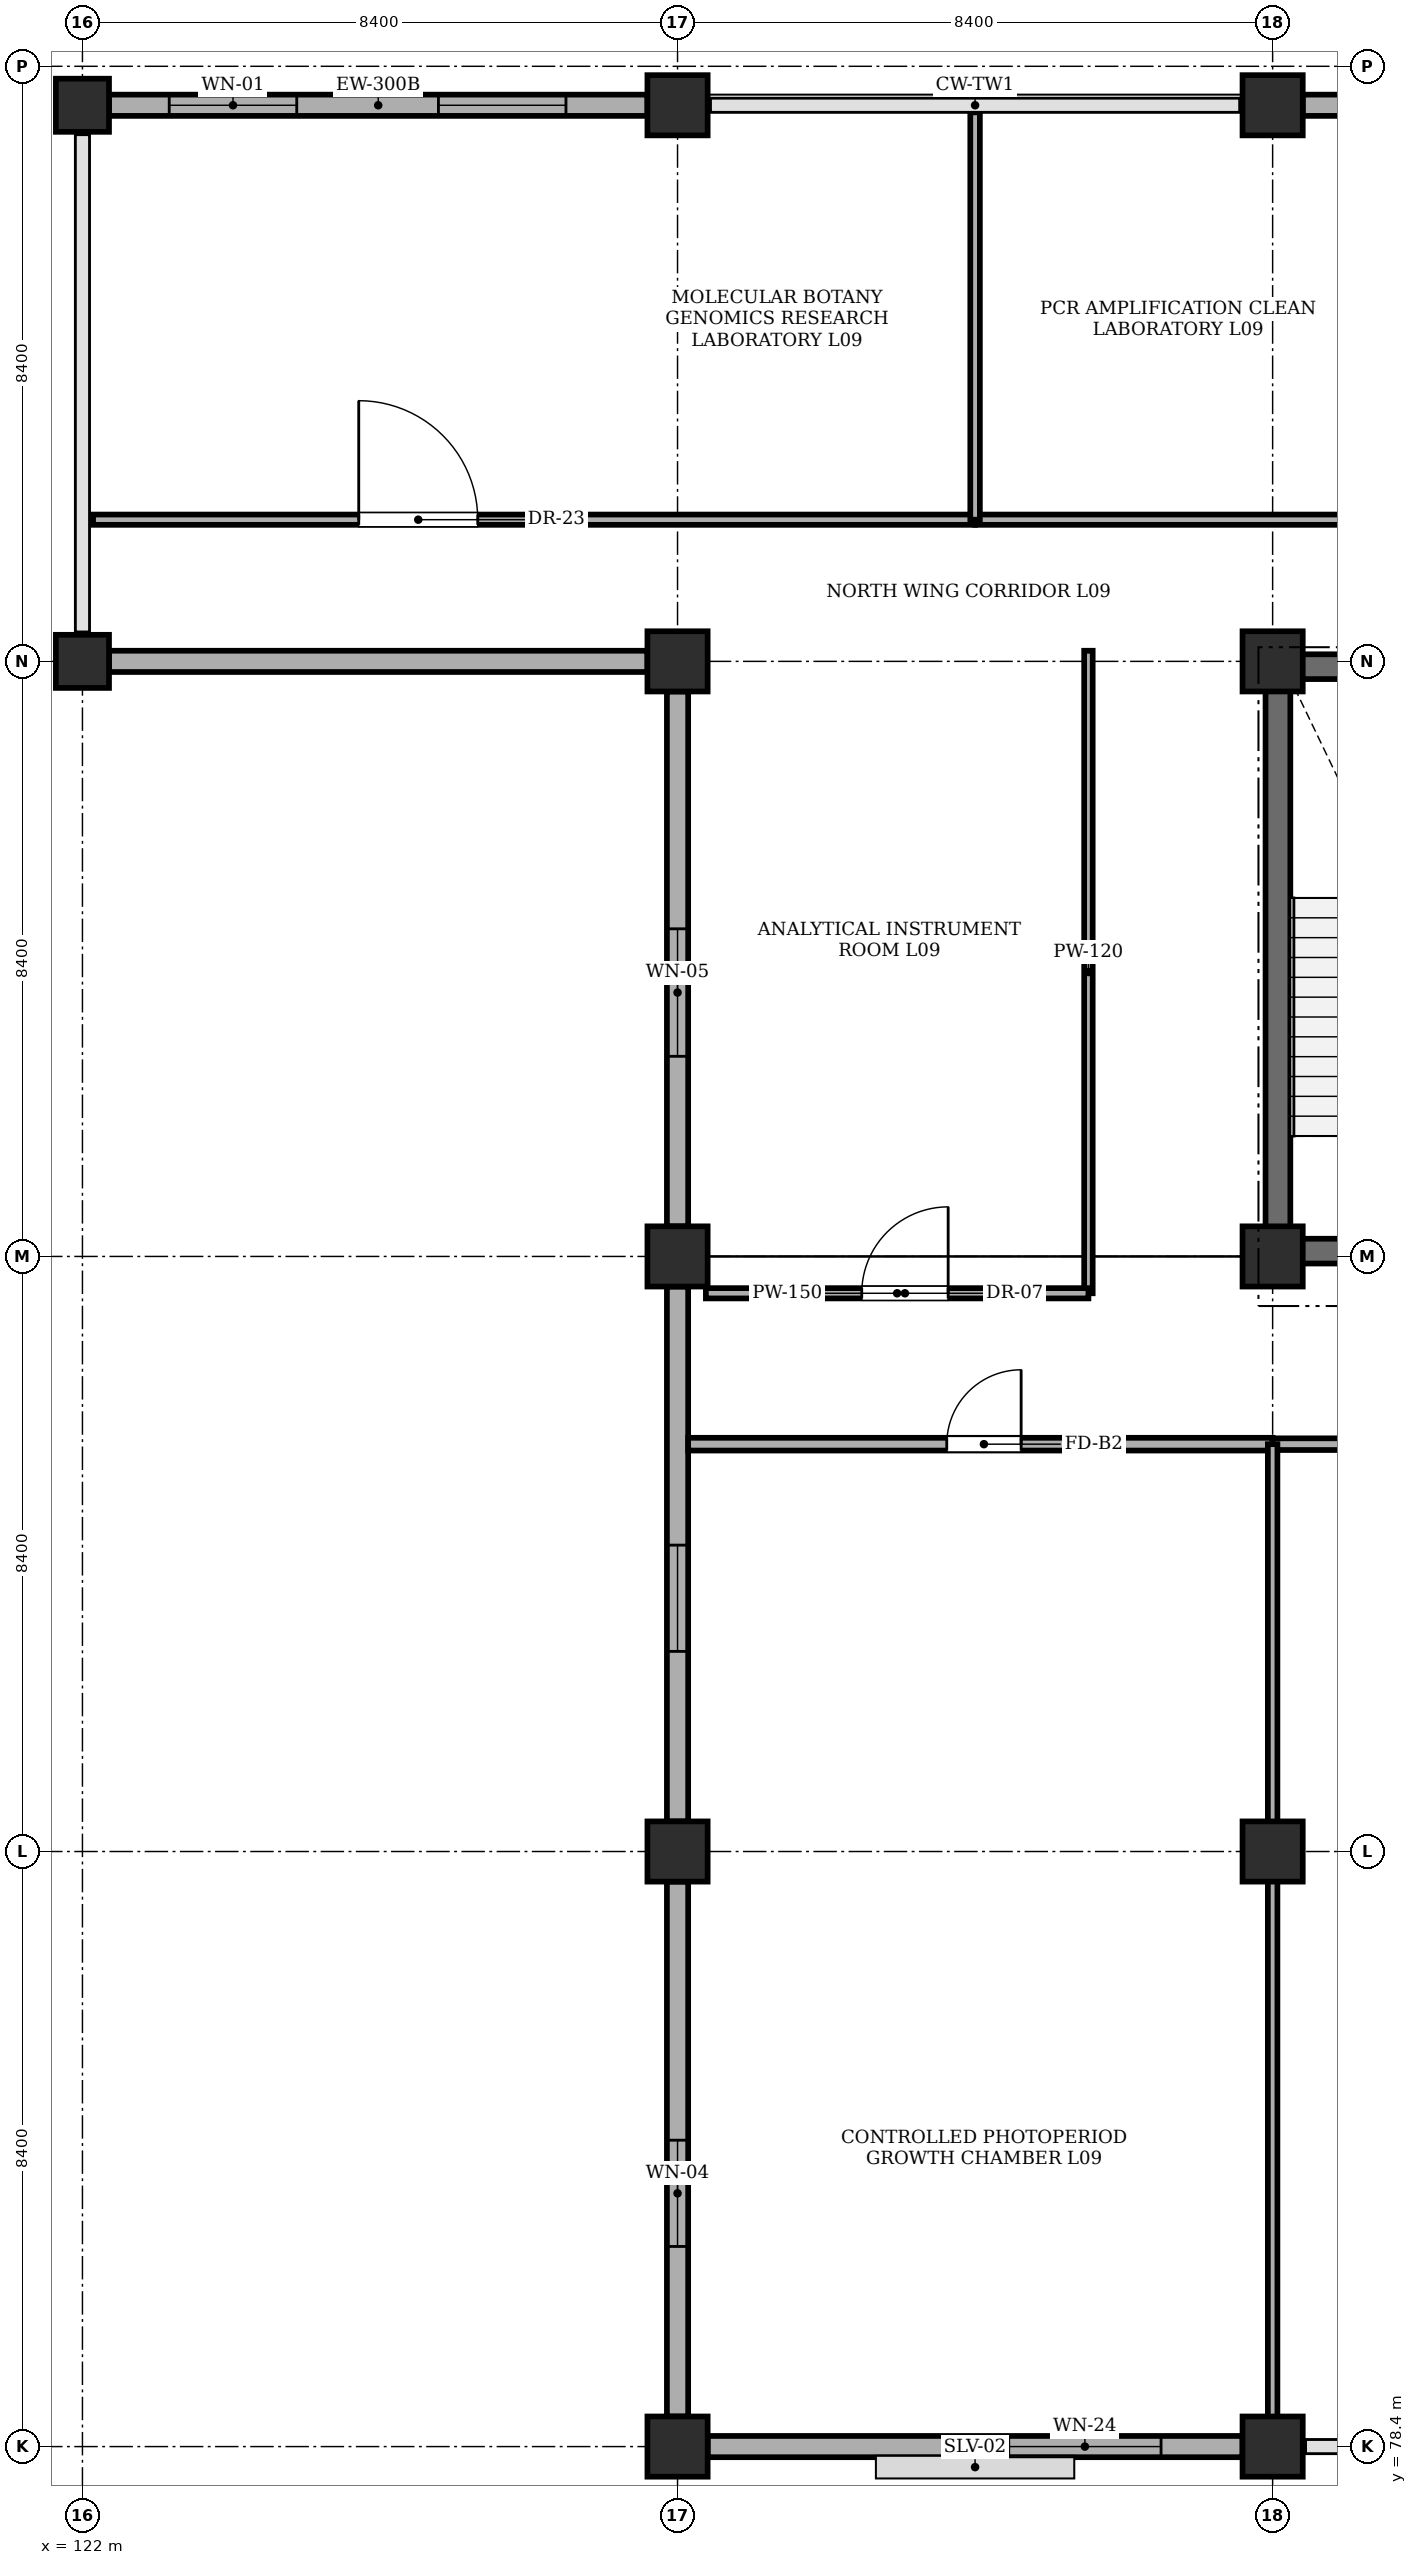
"""IFC4 building model, lengths in metres.
Left out: names, types, materials, properties, quantities, classifications, styles, units other than length and angle.
Written with IfcOpenShell. Run it as: python <this file> out.ifc"""

import sys

from ifc_helpers import new_model, si_unit, direction, frame, frame_2d, origin, origin_2d, place, context, subcontext, project, spatial, rectangle, extrude, element, fill, save


model = new_model("IFC4")
c1 = context("Model", 3, precision=1e-05, world=origin(), true_north=direction((0.0, 1.0)))
c2 = subcontext(c1, "Body", "Model", "MODEL_VIEW")
j1 = project(units=[si_unit("LENGTHUNIT", "METRE"), si_unit("PLANEANGLEUNIT", "RADIAN")], contexts=[c1])
p1 = place(None, origin())
s1 = spatial("IfcSite", under=j1, at=p1, CompositionType="ELEMENT")
p2 = place(p1, origin())
s2 = spatial("IfcBuilding", under=s1, at=p2, CompositionType="ELEMENT")
p3 = place(p2, frame((0.0, 0.0, 36.0)))
s3 = spatial("IfcBuildingStorey", under=s2, at=p3, CompositionType="ELEMENT", Elevation=36.0)
for number, where, z_axis, x_axis in (
    (1, (122.0, 103.6, 0.0), (0.0, 0.0, 1.0), (1.0, 0.0, 0.0)),
    (2, (122.0, 111.45, 0.0), (0.0, 0.0, 1.0), (1.0, 0.0, 0.0)),
):
    element("IfcColumn", number, at=place(p3, frame(where, z_axis=z_axis, x_axis=x_axis)), inside=s3, PredefinedType="COLUMN", context=c2, shape_type="SweptSolid", body=[
        extrude(rectangle(XDim=0.75, YDim=0.75, at=origin_2d()), origin(), (0.0, 0.0, 1.0), 4.02),
    ])
for number, where, z_axis, x_axis in (
    (3, (130.4, 78.4, 0.0), (0.0, 0.0, 1.0), (1.0, 0.0, 0.0)),
    (4, (130.4, 86.8, 0.0), (0.0, 0.0, 1.0), (1.0, 0.0, 0.0)),
    (5, (130.4, 95.2, 0.0), (0.0, 0.0, 1.0), (1.0, 0.0, 0.0)),
    (6, (130.4, 103.6, 0.0), (0.0, 0.0, 1.0), (1.0, 0.0, 0.0)),
    (7, (130.4, 111.45, 0.0), (0.0, 0.0, 1.0), (1.0, 0.0, 0.0)),
    (8, (138.8, 78.4, 0.0), (0.0, 0.0, 1.0), (1.0, 0.0, 0.0)),
    (9, (138.8, 86.8, 0.0), (0.0, 0.0, 1.0), (1.0, 0.0, 0.0)),
    (10, (138.8, 95.2, 0.0), (0.0, 0.0, 1.0), (1.0, 0.0, 0.0)),
    (11, (138.8, 103.6, 0.0), (0.0, 0.0, 1.0), (1.0, 0.0, 0.0)),
    (12, (138.8, 111.45, 0.0), (0.0, 0.0, 1.0), (1.0, 0.0, 0.0)),
):
    element("IfcColumn", number, at=place(p3, frame(where, z_axis=z_axis, x_axis=x_axis)), inside=s3, PredefinedType="COLUMN", context=c2, shape_type="SweptSolid", body=[
        extrude(rectangle(XDim=0.85, YDim=0.85, at=origin_2d()), origin(), (0.0, 0.0, 1.0), 4.02),
    ])
for number, where, z_axis, x_axis in (
    (13, (138.7, 95.275, 0.0), (0.0, 0.0, 1.0), (1.0, 0.0, 0.0)),
    (14, (138.7, 103.525, 0.0), (0.0, 0.0, 1.0), (1.0, 0.0, 0.0)),
):
    element("IfcWall", number, at=place(p3, frame(where, z_axis=z_axis, x_axis=x_axis)), inside=s3, PredefinedType="SHEAR", context=c2, shape_type="SweptSolid", body=[
        extrude(rectangle(XDim=3.8, YDim=0.35, at=frame_2d((1.9, 0.0))), origin(), (0.0, 0.0, 1.0), 4.02),
    ])
p4 = place(p3, frame((138.875, 95.45, 0.0), z_axis=(0.0, 0.0, 1.0), x_axis=(0.0, 1.0, 0.0)))
e15 = element("IfcWall", 15, at=p4, inside=s3, PredefinedType="SHEAR", context=c2, shape_type="SweptSolid", body=[
    extrude(rectangle(XDim=7.9, YDim=0.35, at=frame_2d((3.95, 0.0))), origin(), (0.0, 0.0, 1.0), 4.02),
])
p5 = place(p3, frame((122.375, 111.45, 0.0), z_axis=(0.0, 0.0, 1.0), x_axis=(1.0, 0.0, 0.0)))
e16 = element("IfcWall", 16, at=p5, inside=s3, PredefinedType="STANDARD", context=c2, shape_type="SweptSolid", body=[
    extrude(rectangle(XDim=7.6, YDim=0.3, at=frame_2d((3.8, 0.0))), origin(), (0.0, 0.0, 1.0), 3.32),
])
p6 = place(p5, frame((0.85, 0.0, 0.9)))
e17 = element("IfcOpeningElement", 17, at=p6, cuts=e16, PredefinedType="OPENING", context=c2, shape_type="SweptSolid", body=[
    extrude(rectangle(XDim=1.8, YDim=2.1, at=frame_2d((0.9, 1.05))), frame((0.0, 0.16, 0.0), z_axis=(0.0, -1.0, 0.0), x_axis=(1.0, 0.0, 0.0)), (0.0, 0.0, 1.0), 0.32),
])
p7 = place(p5, frame((4.65, 0.0, 0.9)))
e18 = element("IfcOpeningElement", 18, at=p7, cuts=e16, PredefinedType="OPENING", context=c2, shape_type="SweptSolid", body=[
    extrude(rectangle(XDim=1.8, YDim=2.1, at=frame_2d((0.9, 1.05))), frame((0.0, 0.16, 0.0), z_axis=(0.0, -1.0, 0.0), x_axis=(1.0, 0.0, 0.0)), (0.0, 0.0, 1.0), 0.32),
])
p8 = place(p3, frame((139.225, 111.45, 0.0), z_axis=(0.0, 0.0, 1.0), x_axis=(1.0, 0.0, 0.0)))
e19 = element("IfcWall", 19, at=p8, inside=s3, PredefinedType="STANDARD", context=c2, shape_type="SweptSolid", body=[
    extrude(rectangle(XDim=7.55, YDim=0.3, at=frame_2d((3.775, 0.0))), origin(), (0.0, 0.0, 1.0), 3.32),
])
p9 = place(p8, frame((0.85, 0.0, 0.9)))
e20 = element("IfcOpeningElement", 20, at=p9, cuts=e19, PredefinedType="OPENING", context=c2, shape_type="SweptSolid", body=[
    extrude(rectangle(XDim=1.8, YDim=2.1, at=frame_2d((0.9, 1.05))), frame((0.0, 0.16, 0.0), z_axis=(0.0, -1.0, 0.0), x_axis=(1.0, 0.0, 0.0)), (0.0, 0.0, 1.0), 0.32),
])
p10 = place(p8, frame((4.65, 0.0, 0.9)))
e21 = element("IfcOpeningElement", 21, at=p10, cuts=e19, PredefinedType="OPENING", context=c2, shape_type="SweptSolid", body=[
    extrude(rectangle(XDim=1.8, YDim=2.1, at=frame_2d((0.9, 1.05))), frame((0.0, 0.16, 0.0), z_axis=(0.0, -1.0, 0.0), x_axis=(1.0, 0.0, 0.0)), (0.0, 0.0, 1.0), 0.32),
])
p11 = place(p3, frame((138.375, 78.4, 0.0), z_axis=(0.0, 0.0, 1.0), x_axis=(-1.0, 0.0, 0.0)))
e22 = element("IfcWall", 22, at=p11, inside=s3, PredefinedType="STANDARD", context=c2, shape_type="SweptSolid", body=[
    extrude(rectangle(XDim=7.55, YDim=0.3, at=frame_2d((3.775, 0.0))), origin(), (0.0, 0.0, 1.0), 3.32),
])
p12 = place(p11, frame((1.15, 0.0, 0.95)))
e23 = element("IfcOpeningElement", 23, at=p12, cuts=e22, PredefinedType="OPENING", context=c2, shape_type="SweptSolid", body=[
    extrude(rectangle(XDim=2.15, YDim=1.95, at=frame_2d((1.075, 0.975))), frame((0.0, 0.16, 0.0), z_axis=(0.0, -1.0, 0.0), x_axis=(1.0, 0.0, 0.0)), (0.0, 0.0, 1.0), 0.32),
])
p13 = place(p3, frame((130.4, 78.825, 0.0), z_axis=(0.0, 0.0, 1.0), x_axis=(0.0, 1.0, 0.0)))
e24 = element("IfcWall", 24, at=p13, inside=s3, PredefinedType="STANDARD", context=c2, shape_type="SweptSolid", body=[
    extrude(rectangle(XDim=7.55, YDim=0.3, at=frame_2d((3.775, 0.0))), origin(), (0.0, 0.0, 1.0), 3.32),
])
p14 = place(p13, frame((2.4, 0.0, 0.95)))
e25 = element("IfcOpeningElement", 25, at=p14, cuts=e24, PredefinedType="OPENING", context=c2, shape_type="SweptSolid", body=[
    extrude(rectangle(XDim=1.5, YDim=1.8, at=frame_2d((0.75, 0.9))), frame((0.0, 0.16, 0.0), z_axis=(0.0, -1.0, 0.0), x_axis=(1.0, 0.0, 0.0)), (0.0, 0.0, 1.0), 0.32),
])
p15 = place(p3, frame((130.4, 87.225, 0.0), z_axis=(0.0, 0.0, 1.0), x_axis=(0.0, 1.0, 0.0)))
e26 = element("IfcWall", 26, at=p15, inside=s3, PredefinedType="STANDARD", context=c2, shape_type="SweptSolid", body=[
    extrude(rectangle(XDim=7.55, YDim=0.3, at=frame_2d((3.775, 0.0))), origin(), (0.0, 0.0, 1.0), 3.32),
])
p16 = place(p15, frame((2.4, 0.0, 0.95)))
e27 = element("IfcOpeningElement", 27, at=p16, cuts=e26, PredefinedType="OPENING", context=c2, shape_type="SweptSolid", body=[
    extrude(rectangle(XDim=1.5, YDim=1.8, at=frame_2d((0.75, 0.9))), frame((0.0, 0.16, 0.0), z_axis=(0.0, -1.0, 0.0), x_axis=(1.0, 0.0, 0.0)), (0.0, 0.0, 1.0), 0.32),
])
p17 = place(p3, frame((130.4, 95.625, 0.0), z_axis=(0.0, 0.0, 1.0), x_axis=(0.0, 1.0, 0.0)))
e28 = element("IfcWall", 28, at=p17, inside=s3, PredefinedType="STANDARD", context=c2, shape_type="SweptSolid", body=[
    extrude(rectangle(XDim=7.55, YDim=0.3, at=frame_2d((3.775, 0.0))), origin(), (0.0, 0.0, 1.0), 3.32),
])
p18 = place(p17, frame((2.4, 0.0, 1.0)))
e29 = element("IfcOpeningElement", 29, at=p18, cuts=e28, PredefinedType="OPENING", context=c2, shape_type="SweptSolid", body=[
    extrude(rectangle(XDim=1.8, YDim=1.8, at=frame_2d((0.9, 0.9))), frame((0.0, 0.16, 0.0), z_axis=(0.0, -1.0, 0.0), x_axis=(1.0, 0.0, 0.0)), (0.0, 0.0, 1.0), 0.32),
])
p19 = place(p3, frame((129.975, 103.6, 0.0), z_axis=(0.0, 0.0, 1.0), x_axis=(-1.0, 0.0, 0.0)))
e30 = element("IfcWall", 30, at=p19, inside=s3, PredefinedType="STANDARD", context=c2, shape_type="SweptSolid", body=[
    extrude(rectangle(XDim=7.6, YDim=0.3, at=frame_2d((3.8, 0.0))), origin(), (0.0, 0.0, 1.0), 3.32),
])
p20 = place(p3, frame((136.2, 94.68, 0.0), z_axis=(0.0, 0.0, 1.0), x_axis=(0.0, 1.0, 0.0)))
e31 = element("IfcWall", 31, at=p20, inside=s3, PredefinedType="PARTITIONING", context=c2, shape_type="SweptSolid", body=[
    extrude(rectangle(XDim=9.07, YDim=0.12, at=frame_2d((4.535, 0.0))), origin(), (0.0, 0.0, 1.0), 4.02),
])
p21 = place(p3, frame((130.8, 94.68, 0.0), z_axis=(0.0, 0.0, 1.0), x_axis=(1.0, 0.0, 0.0)))
e32 = element("IfcWall", 32, at=p21, inside=s3, PredefinedType="PARTITIONING", context=c2, shape_type="SweptSolid", body=[
    extrude(rectangle(XDim=5.4, YDim=0.145, at=frame_2d((2.7, 0.0))), origin(), (0.0, 0.0, 1.0), 4.02),
])
p22 = place(p21, frame((2.2, 0.0, 0.0)))
e33 = element("IfcOpeningElement", 33, at=p22, cuts=e32, PredefinedType="OPENING", context=c2, shape_type="SweptSolid", body=[
    extrude(rectangle(XDim=1.22, YDim=2.2, at=frame_2d((0.61, 1.1))), frame((0.0, 0.083, 0.0), z_axis=(0.0, -1.0, 0.0), x_axis=(1.0, 0.0, 0.0)), (0.0, 0.0, 1.0), 0.165),
])
p23 = place(p3, frame((122.15, 105.6, 0.0), z_axis=(0.0, 0.0, 1.0), x_axis=(1.0, 0.0, 0.0)))
e34 = element("IfcWall", 34, at=p23, inside=s3, PredefinedType="PARTITIONING", context=c2, shape_type="SweptSolid", body=[
    extrude(rectangle(XDim=12.45, YDim=0.145, at=frame_2d((6.225, 0.0))), origin(), (0.0, 0.0, 1.0), 4.02),
])
p24 = place(p23, frame((3.75, 0.0, 0.0)))
e35 = element("IfcOpeningElement", 35, at=p24, cuts=e34, PredefinedType="OPENING", context=c2, shape_type="SweptSolid", body=[
    extrude(rectangle(XDim=1.68, YDim=2.24, at=frame_2d((0.84, 1.12))), frame((0.0, 0.083, 0.0), z_axis=(0.0, -1.0, 0.0), x_axis=(1.0, 0.0, 0.0)), (0.0, 0.0, 1.0), 0.165),
])
p25 = place(p3, frame((134.6, 105.6, 0.0), z_axis=(0.0, 0.0, 1.0), x_axis=(1.0, 0.0, 0.0)))
e36 = element("IfcWall", 36, at=p25, inside=s3, PredefinedType="PARTITIONING", context=c2, shape_type="SweptSolid", body=[
    extrude(rectangle(XDim=12.6, YDim=0.145, at=frame_2d((6.3, 0.0))), origin(), (0.0, 0.0, 1.0), 4.02),
])
p26 = place(p25, frame((6.8, 0.0, 0.0)))
e37 = element("IfcOpeningElement", 37, at=p26, cuts=e36, PredefinedType="OPENING", context=c2, shape_type="SweptSolid", body=[
    extrude(rectangle(XDim=1.22, YDim=2.2, at=frame_2d((0.61, 1.1))), frame((0.0, 0.083, 0.0), z_axis=(0.0, -1.0, 0.0), x_axis=(1.0, 0.0, 0.0)), (0.0, 0.0, 1.0), 0.165),
])
p27 = place(p3, frame((134.6, 105.6, 0.0), z_axis=(0.0, 0.0, 1.0), x_axis=(0.0, 1.0, 0.0)))
e38 = element("IfcWall", 38, at=p27, inside=s3, PredefinedType="PARTITIONING", context=c2, shape_type="SweptSolid", body=[
    extrude(rectangle(XDim=5.75, YDim=0.135, at=frame_2d((2.875, 0.0))), origin(), (0.0, 0.0, 1.0), 3.52),
])
p28 = place(p3, frame((130.55, 92.55, 0.0), z_axis=(0.0, 0.0, 1.0), x_axis=(1.0, 0.0, 0.0)))
e39 = element("IfcWall", 39, at=p28, inside=s3, PredefinedType="STANDARD", context=c2, shape_type="SweptSolid", body=[
    extrude(rectangle(XDim=8.25, YDim=0.18, at=frame_2d((4.125, 0.0))), origin(), (0.0, 0.0, 1.0), 4.02),
])
p29 = place(p28, frame((3.65, 0.0, 0.0)))
e40 = element("IfcOpeningElement", 40, at=p29, cuts=e39, PredefinedType="OPENING", context=c2, shape_type="SweptSolid", body=[
    extrude(rectangle(XDim=1.05, YDim=2.15, at=frame_2d((0.525, 1.075))), frame((0.0, 0.1, 0.0), z_axis=(0.0, -1.0, 0.0), x_axis=(1.0, 0.0, 0.0)), (0.0, 0.0, 1.0), 0.2),
])
p30 = place(p3, frame((138.8, 92.55, 0.0), z_axis=(0.0, 0.0, 1.0), x_axis=(1.0, 0.0, 0.0)))
e41 = element("IfcWall", 41, at=p30, inside=s3, PredefinedType="PARTITIONING", context=c2, shape_type="SweptSolid", body=[
    extrude(rectangle(XDim=12.6, YDim=0.165, at=frame_2d((6.3, 0.0))), origin(), (0.0, 0.0, 1.0), 4.02),
])
p31 = place(p30, frame((3.4, 0.0, 0.0)))
e42 = element("IfcOpeningElement", 42, at=p31, cuts=e41, PredefinedType="OPENING", context=c2, shape_type="SweptSolid", body=[
    extrude(rectangle(XDim=1.22, YDim=2.2, at=frame_2d((0.61, 1.1))), frame((0.0, 0.093, 0.0), z_axis=(0.0, -1.0, 0.0), x_axis=(1.0, 0.0, 0.0)), (0.0, 0.0, 1.0), 0.185),
])
p32 = place(p3, frame((138.8, 78.55, 0.0), z_axis=(0.0, 0.0, 1.0), x_axis=(0.0, 1.0, 0.0)))
e43 = element("IfcWall", 43, at=p32, inside=s3, PredefinedType="PARTITIONING", context=c2, shape_type="SweptSolid", body=[
    extrude(rectangle(XDim=14.0, YDim=0.135, at=frame_2d((7.0, 0.0))), origin(), (0.0, 0.0, 1.0), 3.32),
])
p33 = place(p6, origin())
e44 = element("IfcWindow", 44, at=p33, inside=s3, PartitioningType="DOUBLE_PANEL_VERTICAL", PredefinedType="WINDOW", context=c2, shape_type="SweptSolid", body=[
    extrude(rectangle(XDim=1.8, YDim=2.1, at=frame_2d((0.9, 1.05))), frame((0.0, 0.03, 0.0), z_axis=(0.0, -1.0, 0.0), x_axis=(1.0, 0.0, 0.0)), (0.0, 0.0, 1.0), 0.06),
])
fill(e17, e44)
p34 = place(p7, origin())
e45 = element("IfcWindow", 45, at=p34, inside=s3, PartitioningType="DOUBLE_PANEL_VERTICAL", PredefinedType="WINDOW", context=c2, shape_type="SweptSolid", body=[
    extrude(rectangle(XDim=1.8, YDim=2.1, at=frame_2d((0.9, 1.05))), frame((0.0, 0.03, 0.0), z_axis=(0.0, -1.0, 0.0), x_axis=(1.0, 0.0, 0.0)), (0.0, 0.0, 1.0), 0.06),
])
fill(e18, e45)
p35 = place(p12, origin())
e46 = element("IfcWindow", 46, at=p35, inside=s3, PartitioningType="DOUBLE_PANEL_VERTICAL", PredefinedType="WINDOW", context=c2, shape_type="SweptSolid", body=[
    extrude(rectangle(XDim=2.15, YDim=1.95, at=frame_2d((1.075, 0.975))), frame((0.0, 0.03, 0.0), z_axis=(0.0, -1.0, 0.0), x_axis=(1.0, 0.0, 0.0)), (0.0, 0.0, 1.0), 0.06),
])
fill(e23, e46)
p36 = place(p14, origin())
e47 = element("IfcWindow", 47, at=p36, inside=s3, PartitioningType="DOUBLE_PANEL_VERTICAL", PredefinedType="WINDOW", context=c2, shape_type="SweptSolid", body=[
    extrude(rectangle(XDim=1.5, YDim=1.8, at=frame_2d((0.75, 0.9))), frame((0.0, 0.03, 0.0), z_axis=(0.0, -1.0, 0.0), x_axis=(1.0, 0.0, 0.0)), (0.0, 0.0, 1.0), 0.06),
])
fill(e25, e47)
p37 = place(p16, origin())
e48 = element("IfcWindow", 48, at=p37, inside=s3, PartitioningType="DOUBLE_PANEL_VERTICAL", PredefinedType="WINDOW", context=c2, shape_type="SweptSolid", body=[
    extrude(rectangle(XDim=1.5, YDim=1.8, at=frame_2d((0.75, 0.9))), frame((0.0, 0.03, 0.0), z_axis=(0.0, -1.0, 0.0), x_axis=(1.0, 0.0, 0.0)), (0.0, 0.0, 1.0), 0.06),
])
fill(e27, e48)
p38 = place(p18, origin())
e49 = element("IfcWindow", 49, at=p38, inside=s3, PartitioningType="DOUBLE_PANEL_VERTICAL", PredefinedType="WINDOW", context=c2, shape_type="SweptSolid", body=[
    extrude(rectangle(XDim=1.8, YDim=1.8, at=frame_2d((0.9, 0.9))), frame((0.0, 0.03, 0.0), z_axis=(0.0, -1.0, 0.0), x_axis=(1.0, 0.0, 0.0)), (0.0, 0.0, 1.0), 0.06),
])
fill(e29, e49)
p39 = place(p22, origin())
e50 = element("IfcDoor", 50, at=p39, inside=s3, OperationType="SINGLE_SWING_RIGHT", PredefinedType="DOOR", context=c2, shape_type="SweptSolid", body=[
    extrude(rectangle(XDim=1.22, YDim=2.2, at=frame_2d((0.61, 1.1))), frame((0.0, 0.025, 0.0), z_axis=(0.0, -1.0, 0.0), x_axis=(1.0, 0.0, 0.0)), (0.0, 0.0, 1.0), 0.05),
])
fill(e33, e50)
p40 = place(p24, origin())
e51 = element("IfcDoor", 51, at=p40, inside=s3, OperationType="SINGLE_SWING_LEFT", PredefinedType="DOOR", context=c2, shape_type="SweptSolid", body=[
    extrude(rectangle(XDim=1.68, YDim=2.24, at=frame_2d((0.84, 1.12))), frame((0.0, 0.025, 0.0), z_axis=(0.0, -1.0, 0.0), x_axis=(1.0, 0.0, 0.0)), (0.0, 0.0, 1.0), 0.05),
])
fill(e35, e51)
p41 = place(p29, origin())
e52 = element("IfcDoor", 52, at=p41, inside=s3, OperationType="SINGLE_SWING_RIGHT", PredefinedType="DOOR", context=c2, shape_type="SweptSolid", body=[
    extrude(rectangle(XDim=1.05, YDim=2.15, at=frame_2d((0.525, 1.075))), frame((0.0, 0.025, 0.0), z_axis=(0.0, -1.0, 0.0), x_axis=(1.0, 0.0, 0.0)), (0.0, 0.0, 1.0), 0.05),
])
fill(e40, e52)
save(model, sys.argv[1])
